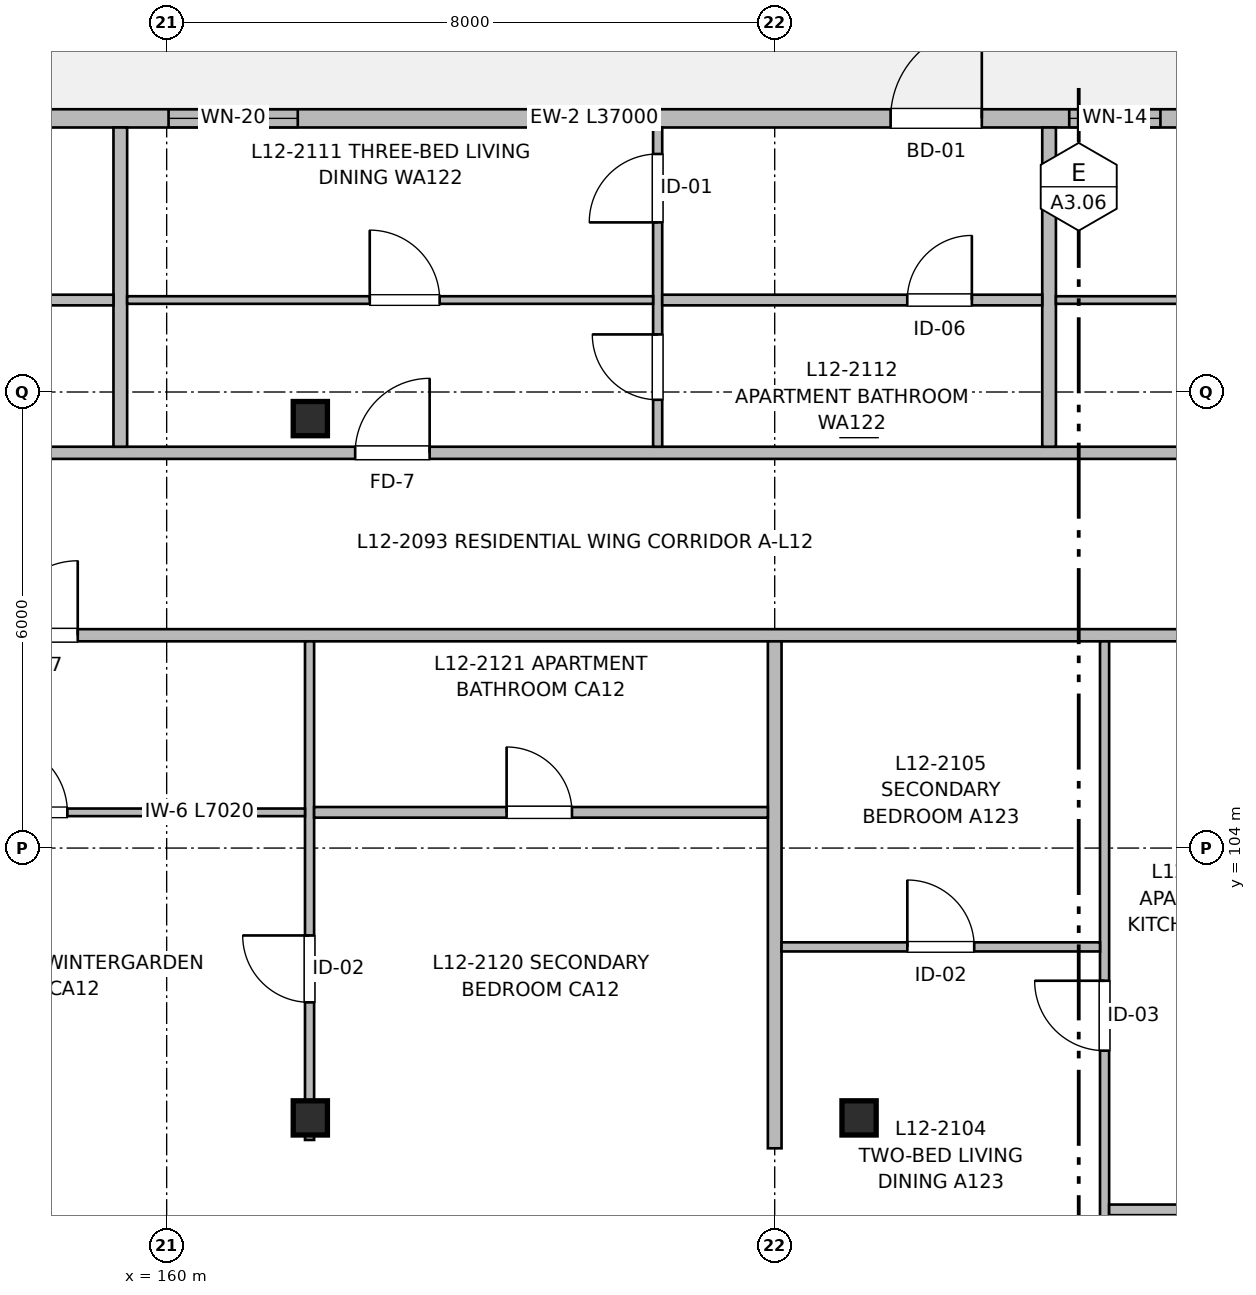
"""IFC4 building model, lengths in metres.
Left out: names, types, materials, properties, quantities, classifications, styles, units other than length and angle.
Written with IfcOpenShell. Run it as: python <this file> out.ifc"""

import sys

from ifc_helpers import new_model, si_unit, direction, frame, frame_2d, origin, origin_2d, place, context, subcontext, project, spatial, rectangle, extrude, element, fill, save


model = new_model("IFC4")
c1 = context("Model", 3, precision=1e-05, world=origin(), true_north=direction((0.0, 1.0)))
c2 = subcontext(c1, "Body", "Model", "MODEL_VIEW")
j1 = project(units=[si_unit("LENGTHUNIT", "METRE"), si_unit("PLANEANGLEUNIT", "RADIAN")], contexts=[c1])
p1 = place(None, origin())
s1 = spatial("IfcSite", under=j1, at=p1, CompositionType="ELEMENT")
p2 = place(p1, origin())
s2 = spatial("IfcBuilding", under=s1, at=p2, CompositionType="ELEMENT")
p3 = place(p2, frame((0.0, 0.0, 39.36)))
s3 = spatial("IfcBuildingStorey", under=s2, at=p3, CompositionType="ELEMENT", Elevation=39.36)
for number, where, z_axis, x_axis in (
    (1, (161.89, 100.45, 0.0), (0.0, 0.0, 1.0), (1.0, 0.0, 0.0)),
    (2, (161.89, 109.65, 0.0), (0.0, 0.0, 1.0), (1.0, 0.0, 0.0)),
    (3, (169.11, 100.45, 0.0), (0.0, 0.0, 1.0), (1.0, 0.0, 0.0)),
    (4, (169.11, 109.65, 0.0), (0.0, 0.0, 1.0), (1.0, 0.0, 0.0)),
):
    element("IfcColumn", number, at=place(p3, frame(where, z_axis=z_axis, x_axis=x_axis)), inside=s3, PredefinedType="COLUMN", context=c2, shape_type="SweptSolid", body=[
        extrude(rectangle(XDim=0.45, YDim=0.45, at=origin_2d()), origin(), (0.0, 0.0, 1.0), 3.2),
    ])
p4 = place(p3, frame((147.0, 113.6, 0.0), z_axis=(0.0, 0.0, 1.0), x_axis=(1.0, 0.0, 0.0)))
e5 = element("IfcWall", 5, at=p4, inside=s3, PredefinedType="SOLIDWALL", context=c2, shape_type="SweptSolid", body=[
    extrude(rectangle(XDim=37.0, YDim=0.24, at=frame_2d((18.5, 0.0))), origin(), (0.0, 0.0, 1.0), 2.98),
])
p5 = place(p4, frame((4.025, 0.0, 0.0)))
e6 = element("IfcOpeningElement", 6, at=p5, cuts=e5, PredefinedType="OPENING", context=c2, shape_type="SweptSolid", body=[
    extrude(rectangle(XDim=1.2, YDim=2.2, at=frame_2d((0.6, 1.1))), frame((0.0, 0.13, 0.0), z_axis=(0.0, -1.0, 0.0), x_axis=(1.0, 0.0, 0.0)), (0.0, 0.0, 1.0), 0.26),
])
p6 = place(p4, frame((7.725, 0.0, 0.72)))
e7 = element("IfcOpeningElement", 7, at=p6, cuts=e5, PredefinedType="OPENING", context=c2, shape_type="SweptSolid", body=[
    extrude(rectangle(XDim=2.25, YDim=1.5, at=frame_2d((1.125, 0.75))), frame((0.0, 0.13, 0.0), z_axis=(0.0, -1.0, 0.0), x_axis=(1.0, 0.0, 0.0)), (0.0, 0.0, 1.0), 0.26),
])
p7 = place(p4, frame((13.025, 0.0, 0.72)))
e8 = element("IfcOpeningElement", 8, at=p7, cuts=e5, PredefinedType="OPENING", context=c2, shape_type="SweptSolid", body=[
    extrude(rectangle(XDim=1.7, YDim=1.5, at=frame_2d((0.85, 0.75))), frame((0.0, 0.13, 0.0), z_axis=(0.0, -1.0, 0.0), x_axis=(1.0, 0.0, 0.0)), (0.0, 0.0, 1.0), 0.26),
])
p8 = place(p4, frame((22.525, 0.0, 0.0)))
e9 = element("IfcOpeningElement", 9, at=p8, cuts=e5, PredefinedType="OPENING", context=c2, shape_type="SweptSolid", body=[
    extrude(rectangle(XDim=1.2, YDim=2.2, at=frame_2d((0.6, 1.1))), frame((0.0, 0.13, 0.0), z_axis=(0.0, -1.0, 0.0), x_axis=(1.0, 0.0, 0.0)), (0.0, 0.0, 1.0), 0.26),
])
p9 = place(p4, frame((24.875, 0.0, 0.9)))
e10 = element("IfcOpeningElement", 10, at=p9, cuts=e5, PredefinedType="OPENING", context=c2, shape_type="SweptSolid", body=[
    extrude(rectangle(XDim=1.2, YDim=1.05, at=frame_2d((0.6, 0.525))), frame((0.0, 0.13, 0.0), z_axis=(0.0, -1.0, 0.0), x_axis=(1.0, 0.0, 0.0)), (0.0, 0.0, 1.0), 0.26),
])
p10 = place(p4, frame((32.1, 0.0, 0.77)))
e11 = element("IfcOpeningElement", 11, at=p10, cuts=e5, PredefinedType="OPENING", context=c2, shape_type="SweptSolid", body=[
    extrude(rectangle(XDim=1.45, YDim=1.45, at=frame_2d((0.725, 0.725))), frame((0.0, 0.13, 0.0), z_axis=(0.0, -1.0, 0.0), x_axis=(1.0, 0.0, 0.0)), (0.0, 0.0, 1.0), 0.26),
])
p11 = place(p3, frame((147.16, 106.8, 0.0), z_axis=(0.0, 0.0, 1.0), x_axis=(1.0, 0.0, 0.0)))
e12 = element("IfcWall", 12, at=p11, inside=s3, PredefinedType="PARTITIONING", context=c2, shape_type="SweptSolid", body=[
    extrude(rectangle(XDim=27.64, YDim=0.16, at=frame_2d((13.82, 0.0))), origin(), (0.0, 0.0, 1.0), 2.935),
])
p12 = place(p11, frame((3.515, 0.0, 0.0)))
e13 = element("IfcOpeningElement", 13, at=p12, cuts=e12, PredefinedType="OPENING", context=c2, shape_type="SweptSolid", body=[
    extrude(rectangle(XDim=1.05, YDim=2.15, at=frame_2d((0.525, 1.075))), frame((0.0, 0.09, 0.0), z_axis=(0.0, -1.0, 0.0), x_axis=(1.0, 0.0, 0.0)), (0.0, 0.0, 1.0), 0.18),
])
p13 = place(p11, frame((10.69, 0.0, 0.0)))
e14 = element("IfcOpeningElement", 14, at=p13, cuts=e12, PredefinedType="OPENING", context=c2, shape_type="SweptSolid", body=[
    extrude(rectangle(XDim=0.98, YDim=2.15, at=frame_2d((0.49, 1.075))), frame((0.0, 0.09, 0.0), z_axis=(0.0, -1.0, 0.0), x_axis=(1.0, 0.0, 0.0)), (0.0, 0.0, 1.0), 0.18),
])
p14 = place(p3, frame((147.16, 109.2, 0.0), z_axis=(0.0, 0.0, 1.0), x_axis=(1.0, 0.0, 0.0)))
e15 = element("IfcWall", 15, at=p14, inside=s3, PredefinedType="PARTITIONING", context=c2, shape_type="SweptSolid", body=[
    extrude(rectangle(XDim=36.68, YDim=0.16, at=frame_2d((18.34, 0.0))), origin(), (0.0, 0.0, 1.0), 2.935),
])
p15 = place(p14, frame((3.03, 0.0, 0.0)))
e16 = element("IfcOpeningElement", 16, at=p15, cuts=e15, PredefinedType="OPENING", context=c2, shape_type="SweptSolid", body=[
    extrude(rectangle(XDim=0.98, YDim=2.15, at=frame_2d((0.49, 1.075))), frame((0.0, 0.09, 0.0), z_axis=(0.0, -1.0, 0.0), x_axis=(1.0, 0.0, 0.0)), (0.0, 0.0, 1.0), 0.18),
])
p16 = place(p14, frame((15.32, 0.0, 0.0)))
e17 = element("IfcOpeningElement", 17, at=p16, cuts=e15, PredefinedType="OPENING", context=c2, shape_type="SweptSolid", body=[
    extrude(rectangle(XDim=0.98, YDim=2.15, at=frame_2d((0.49, 1.075))), frame((0.0, 0.09, 0.0), z_axis=(0.0, -1.0, 0.0), x_axis=(1.0, 0.0, 0.0)), (0.0, 0.0, 1.0), 0.18),
])
p17 = place(p14, frame((27.57, 0.0, 0.0)))
e18 = element("IfcOpeningElement", 18, at=p17, cuts=e15, PredefinedType="OPENING", context=c2, shape_type="SweptSolid", body=[
    extrude(rectangle(XDim=0.98, YDim=2.15, at=frame_2d((0.49, 1.075))), frame((0.0, 0.09, 0.0), z_axis=(0.0, -1.0, 0.0), x_axis=(1.0, 0.0, 0.0)), (0.0, 0.0, 1.0), 0.18),
])
p18 = place(p3, frame((168.0, 100.05, 0.0), z_axis=(0.0, 0.0, 1.0), x_axis=(0.0, 1.0, 0.0)))
e19 = element("IfcWall", 19, at=p18, inside=s3, PredefinedType="PARTITIONING", context=c2, shape_type="SweptSolid", body=[
    extrude(rectangle(XDim=6.67, YDim=0.18, at=frame_2d((3.335, 0.0))), origin(), (0.0, 0.0, 1.0), 2.935),
])
p19 = place(p3, frame((172.34, 92.87, 0.0), z_axis=(0.0, 0.0, 1.0), x_axis=(0.0, 1.0, 0.0)))
e20 = element("IfcWall", 20, at=p19, inside=s3, PredefinedType="PARTITIONING", context=c2, shape_type="SweptSolid", body=[
    extrude(rectangle(XDim=13.85, YDim=0.12, at=frame_2d((6.925, 0.0))), origin(), (0.0, 0.0, 1.0), 2.935),
])
p20 = place(p19, frame((2.421, 0.0, 0.0)))
e21 = element("IfcOpeningElement", 21, at=p20, cuts=e20, PredefinedType="OPENING", context=c2, shape_type="SweptSolid", body=[
    extrude(rectangle(XDim=0.86, YDim=2.1, at=frame_2d((0.43, 1.05))), frame((0.0, 0.07, 0.0), z_axis=(0.0, -1.0, 0.0), x_axis=(1.0, 0.0, 0.0)), (0.0, 0.0, 1.0), 0.14),
])
p21 = place(p19, frame((8.464, 0.0, 0.0)))
e22 = element("IfcOpeningElement", 22, at=p21, cuts=e20, PredefinedType="OPENING", context=c2, shape_type="SweptSolid", body=[
    extrude(rectangle(XDim=0.92, YDim=2.1, at=frame_2d((0.46, 1.05))), frame((0.0, 0.07, 0.0), z_axis=(0.0, -1.0, 0.0), x_axis=(1.0, 0.0, 0.0)), (0.0, 0.0, 1.0), 0.14),
])
p22 = place(p3, frame((172.4, 99.24, 0.0), z_axis=(0.0, 0.0, 1.0), x_axis=(1.0, 0.0, 0.0)))
e23 = element("IfcWall", 23, at=p22, inside=s3, PredefinedType="PARTITIONING", context=c2, shape_type="SweptSolid", body=[
    extrude(rectangle(XDim=2.32, YDim=0.14, at=frame_2d((1.16, 0.0))), origin(), (0.0, 0.0, 1.0), 2.935),
])
p23 = place(p3, frame((168.09, 102.7, 0.0), z_axis=(0.0, 0.0, 1.0), x_axis=(1.0, 0.0, 0.0)))
e24 = element("IfcWall", 24, at=p23, inside=s3, PredefinedType="PARTITIONING", context=c2, shape_type="SweptSolid", body=[
    extrude(rectangle(XDim=4.19, YDim=0.12, at=frame_2d((2.095, 0.0))), origin(), (0.0, 0.0, 1.0), 2.935),
])
p24 = place(p23, frame((1.655, 0.0, 0.0)))
e25 = element("IfcOpeningElement", 25, at=p24, cuts=e24, PredefinedType="OPENING", context=c2, shape_type="SweptSolid", body=[
    extrude(rectangle(XDim=0.88, YDim=2.1, at=frame_2d((0.44, 1.05))), frame((0.0, 0.07, 0.0), z_axis=(0.0, -1.0, 0.0), x_axis=(1.0, 0.0, 0.0)), (0.0, 0.0, 1.0), 0.14),
])
for number, where, z_axis, x_axis in (
    (26, (159.39, 109.28, 0.0), (0.0, 0.0, 1.0), (0.0, 1.0, 0.0)),
    (27, (171.61, 109.28, 0.0), (0.0, 0.0, 1.0), (0.0, 1.0, 0.0)),
):
    element("IfcWall", number, at=place(p3, frame(where, z_axis=z_axis, x_axis=x_axis)), inside=s3, PredefinedType="PARTITIONING", context=c2, shape_type="SweptSolid", body=[
        extrude(rectangle(XDim=4.2, YDim=0.18, at=frame_2d((2.1, 0.0))), origin(), (0.0, 0.0, 1.0), 2.935),
    ])
p25 = place(p3, frame((154.26, 111.21, 0.0), z_axis=(0.0, 0.0, 1.0), x_axis=(1.0, 0.0, 0.0)))
e28 = element("IfcWall", 28, at=p25, inside=s3, PredefinedType="PARTITIONING", context=c2, shape_type="SweptSolid", body=[
    extrude(rectangle(XDim=5.04, YDim=0.14, at=frame_2d((2.52, 0.0))), origin(), (0.0, 0.0, 1.0), 2.935),
])
p26 = place(p25, frame((2.04, 0.0, 0.0)))
e29 = element("IfcOpeningElement", 29, at=p26, cuts=e28, PredefinedType="OPENING", context=c2, shape_type="SweptSolid", body=[
    extrude(rectangle(XDim=0.85, YDim=2.05, at=frame_2d((0.425, 1.025))), frame((0.0, 0.08, 0.0), z_axis=(0.0, -1.0, 0.0), x_axis=(1.0, 0.0, 0.0)), (0.0, 0.0, 1.0), 0.16),
])
p27 = place(p3, frame((166.46, 109.28, 0.0), z_axis=(0.0, 0.0, 1.0), x_axis=(0.0, 1.0, 0.0)))
e30 = element("IfcWall", 30, at=p27, inside=s3, PredefinedType="PARTITIONING", context=c2, shape_type="SweptSolid", body=[
    extrude(rectangle(XDim=4.2, YDim=0.12, at=frame_2d((2.1, 0.0))), origin(), (0.0, 0.0, 1.0), 2.935),
])
p28 = place(p27, frame((0.618, 0.0, 0.0)))
e31 = element("IfcOpeningElement", 31, at=p28, cuts=e30, PredefinedType="OPENING", context=c2, shape_type="SweptSolid", body=[
    extrude(rectangle(XDim=0.86, YDim=2.1, at=frame_2d((0.43, 1.05))), frame((0.0, 0.07, 0.0), z_axis=(0.0, -1.0, 0.0), x_axis=(1.0, 0.0, 0.0)), (0.0, 0.0, 1.0), 0.14),
])
p29 = place(p27, frame((2.951, 0.0, 0.0)))
e32 = element("IfcOpeningElement", 32, at=p29, cuts=e30, PredefinedType="OPENING", context=c2, shape_type="SweptSolid", body=[
    extrude(rectangle(XDim=0.9, YDim=2.1, at=frame_2d((0.45, 1.05))), frame((0.0, 0.07, 0.0), z_axis=(0.0, -1.0, 0.0), x_axis=(1.0, 0.0, 0.0)), (0.0, 0.0, 1.0), 0.14),
])
p30 = place(p3, frame((166.52, 111.21, 0.0), z_axis=(0.0, 0.0, 1.0), x_axis=(1.0, 0.0, 0.0)))
e33 = element("IfcWall", 33, at=p30, inside=s3, PredefinedType="PARTITIONING", context=c2, shape_type="SweptSolid", body=[
    extrude(rectangle(XDim=5.0, YDim=0.14, at=frame_2d((2.5, 0.0))), origin(), (0.0, 0.0, 1.0), 2.935),
])
p31 = place(p30, frame((3.224, 0.0, 0.0)))
e34 = element("IfcOpeningElement", 34, at=p31, cuts=e33, PredefinedType="OPENING", context=c2, shape_type="SweptSolid", body=[
    extrude(rectangle(XDim=0.85, YDim=2.05, at=frame_2d((0.425, 1.025))), frame((0.0, 0.08, 0.0), z_axis=(0.0, -1.0, 0.0), x_axis=(1.0, 0.0, 0.0)), (0.0, 0.0, 1.0), 0.16),
])
p32 = place(p3, frame((159.48, 111.21, 0.0), z_axis=(0.0, 0.0, 1.0), x_axis=(1.0, 0.0, 0.0)))
e35 = element("IfcWall", 35, at=p32, inside=s3, PredefinedType="PARTITIONING", context=c2, shape_type="SweptSolid", body=[
    extrude(rectangle(XDim=6.92, YDim=0.1, at=frame_2d((3.46, 0.0))), origin(), (0.0, 0.0, 1.0), 2.935),
])
p33 = place(p32, frame((3.192, 0.0, 0.0)))
e36 = element("IfcOpeningElement", 36, at=p33, cuts=e35, PredefinedType="OPENING", context=c2, shape_type="SweptSolid", body=[
    extrude(rectangle(XDim=0.92, YDim=2.1, at=frame_2d((0.46, 1.05))), frame((0.0, 0.06, 0.0), z_axis=(0.0, -1.0, 0.0), x_axis=(1.0, 0.0, 0.0)), (0.0, 0.0, 1.0), 0.12),
])
p34 = place(p3, frame((171.7, 111.21, 0.0), z_axis=(0.0, 0.0, 1.0), x_axis=(1.0, 0.0, 0.0)))
e37 = element("IfcWall", 37, at=p34, inside=s3, PredefinedType="PARTITIONING", context=c2, shape_type="SweptSolid", body=[
    extrude(rectangle(XDim=6.98, YDim=0.1, at=frame_2d((3.49, 0.0))), origin(), (0.0, 0.0, 1.0), 2.935),
])
p35 = place(p34, frame((2.816, 0.0, 0.0)))
e38 = element("IfcOpeningElement", 38, at=p35, cuts=e37, PredefinedType="OPENING", context=c2, shape_type="SweptSolid", body=[
    extrude(rectangle(XDim=0.92, YDim=2.1, at=frame_2d((0.46, 1.05))), frame((0.0, 0.06, 0.0), z_axis=(0.0, -1.0, 0.0), x_axis=(1.0, 0.0, 0.0)), (0.0, 0.0, 1.0), 0.12),
])
p36 = place(p3, frame((161.88, 100.16, 0.0), z_axis=(0.0, 0.0, 1.0), x_axis=(0.0, 1.0, 0.0)))
e39 = element("IfcWall", 39, at=p36, inside=s3, PredefinedType="PARTITIONING", context=c2, shape_type="SweptSolid", body=[
    extrude(rectangle(XDim=6.56, YDim=0.12, at=frame_2d((3.28, 0.0))), origin(), (0.0, 0.0, 1.0), 2.68),
])
p37 = place(p36, frame((1.81, 0.0, 0.0)))
e40 = element("IfcOpeningElement", 40, at=p37, cuts=e39, PredefinedType="OPENING", context=c2, shape_type="SweptSolid", body=[
    extrude(rectangle(XDim=0.88, YDim=2.1, at=frame_2d((0.44, 1.05))), frame((0.0, 0.07, 0.0), z_axis=(0.0, -1.0, 0.0), x_axis=(1.0, 0.0, 0.0)), (0.0, 0.0, 1.0), 0.14),
])
p38 = place(p3, frame((161.94, 104.47, 0.0), z_axis=(0.0, 0.0, 1.0), x_axis=(1.0, 0.0, 0.0)))
e41 = element("IfcWall", 41, at=p38, inside=s3, PredefinedType="PARTITIONING", context=c2, shape_type="SweptSolid", body=[
    extrude(rectangle(XDim=5.97, YDim=0.14, at=frame_2d((2.985, 0.0))), origin(), (0.0, 0.0, 1.0), 2.935),
])
p39 = place(p38, frame((2.533, 0.0, 0.0)))
e42 = element("IfcOpeningElement", 42, at=p39, cuts=e41, PredefinedType="OPENING", context=c2, shape_type="SweptSolid", body=[
    extrude(rectangle(XDim=0.86, YDim=2.1, at=frame_2d((0.43, 1.05))), frame((0.0, 0.08, 0.0), z_axis=(0.0, -1.0, 0.0), x_axis=(1.0, 0.0, 0.0)), (0.0, 0.0, 1.0), 0.16),
])
p40 = place(p3, frame((154.8, 104.47, 0.0), z_axis=(0.0, 0.0, 1.0), x_axis=(1.0, 0.0, 0.0)))
e43 = element("IfcWall", 43, at=p40, inside=s3, PredefinedType="PARTITIONING", context=c2, shape_type="SweptSolid", body=[
    extrude(rectangle(XDim=7.02, YDim=0.1, at=frame_2d((3.51, 0.0))), origin(), (0.0, 0.0, 1.0), 2.935),
])
p41 = place(p40, frame((2.974, 0.0, 0.0)))
e44 = element("IfcOpeningElement", 44, at=p41, cuts=e43, PredefinedType="OPENING", context=c2, shape_type="SweptSolid", body=[
    extrude(rectangle(XDim=0.92, YDim=2.1, at=frame_2d((0.46, 1.05))), frame((0.0, 0.06, 0.0), z_axis=(0.0, -1.0, 0.0), x_axis=(1.0, 0.0, 0.0)), (0.0, 0.0, 1.0), 0.12),
])
p42 = place(p7, origin())
e45 = element("IfcWindow", 45, at=p42, inside=s3, PartitioningType="SINGLE_PANEL", PredefinedType="WINDOW", context=c2, shape_type="SweptSolid", body=[
    extrude(rectangle(XDim=1.7, YDim=1.5, at=frame_2d((0.85, 0.75))), frame((0.0, 0.03, 0.0), z_axis=(0.0, -1.0, 0.0), x_axis=(1.0, 0.0, 0.0)), (0.0, 0.0, 1.0), 0.06),
])
fill(e8, e45)
p43 = place(p8, origin())
e46 = element("IfcDoor", 46, at=p43, inside=s3, OperationType="SINGLE_SWING_RIGHT", PredefinedType="DOOR", context=c2, shape_type="SweptSolid", body=[
    extrude(rectangle(XDim=1.2, YDim=2.2, at=frame_2d((0.6, 1.1))), frame((0.0, 0.025, 0.0), z_axis=(0.0, -1.0, 0.0), x_axis=(1.0, 0.0, 0.0)), (0.0, 0.0, 1.0), 0.05),
])
fill(e9, e46)
p44 = place(p9, origin())
e47 = element("IfcWindow", 47, at=p44, inside=s3, PartitioningType="SINGLE_PANEL", PredefinedType="WINDOW", context=c2, shape_type="SweptSolid", body=[
    extrude(rectangle(XDim=1.2, YDim=1.05, at=frame_2d((0.6, 0.525))), frame((0.0, 0.03, 0.0), z_axis=(0.0, -1.0, 0.0), x_axis=(1.0, 0.0, 0.0)), (0.0, 0.0, 1.0), 0.06),
])
fill(e10, e47)
p45 = place(p21, origin())
e48 = element("IfcDoor", 48, at=p45, inside=s3, OperationType="SINGLE_SWING_RIGHT", PredefinedType="DOOR", context=c2, shape_type="SweptSolid", body=[
    extrude(rectangle(XDim=0.92, YDim=2.1, at=frame_2d((0.46, 1.05))), frame((0.0, 0.025, 0.0), z_axis=(0.0, -1.0, 0.0), x_axis=(1.0, 0.0, 0.0)), (0.0, 0.0, 1.0), 0.05),
])
fill(e22, e48)
p46 = place(p24, origin())
e49 = element("IfcDoor", 49, at=p46, inside=s3, OperationType="SINGLE_SWING_LEFT", PredefinedType="DOOR", context=c2, shape_type="SweptSolid", body=[
    extrude(rectangle(XDim=0.88, YDim=2.1, at=frame_2d((0.44, 1.05))), frame((0.0, 0.025, 0.0), z_axis=(0.0, -1.0, 0.0), x_axis=(1.0, 0.0, 0.0)), (0.0, 0.0, 1.0), 0.05),
])
fill(e25, e49)
p47 = place(p16, origin())
e50 = element("IfcDoor", 50, at=p47, inside=s3, OperationType="SINGLE_SWING_RIGHT", PredefinedType="DOOR", context=c2, shape_type="SweptSolid", body=[
    extrude(rectangle(XDim=0.98, YDim=2.15, at=frame_2d((0.49, 1.075))), frame((0.0, 0.025, 0.0), z_axis=(0.0, -1.0, 0.0), x_axis=(1.0, 0.0, 0.0)), (0.0, 0.0, 1.0), 0.05),
])
fill(e17, e50)
p48 = place(p33, origin())
e51 = element("IfcDoor", 51, at=p48, inside=s3, OperationType="SINGLE_SWING_LEFT", PredefinedType="DOOR", context=c2, shape_type="SweptSolid", body=[
    extrude(rectangle(XDim=0.92, YDim=2.1, at=frame_2d((0.46, 1.05))), frame((0.0, 0.025, 0.0), z_axis=(0.0, -1.0, 0.0), x_axis=(1.0, 0.0, 0.0)), (0.0, 0.0, 1.0), 0.05),
])
fill(e36, e51)
p49 = place(p28, origin())
e52 = element("IfcDoor", 52, at=p49, inside=s3, OperationType="SINGLE_SWING_RIGHT", PredefinedType="DOOR", context=c2, shape_type="SweptSolid", body=[
    extrude(rectangle(XDim=0.86, YDim=2.1, at=frame_2d((0.43, 1.05))), frame((0.0, 0.025, 0.0), z_axis=(0.0, -1.0, 0.0), x_axis=(1.0, 0.0, 0.0)), (0.0, 0.0, 1.0), 0.05),
])
fill(e31, e52)
p50 = place(p29, origin())
e53 = element("IfcDoor", 53, at=p50, inside=s3, OperationType="SINGLE_SWING_LEFT", PredefinedType="DOOR", context=c2, shape_type="SweptSolid", body=[
    extrude(rectangle(XDim=0.9, YDim=2.1, at=frame_2d((0.45, 1.05))), frame((0.0, 0.025, 0.0), z_axis=(0.0, -1.0, 0.0), x_axis=(1.0, 0.0, 0.0)), (0.0, 0.0, 1.0), 0.05),
])
fill(e32, e53)
p51 = place(p31, origin())
e54 = element("IfcDoor", 54, at=p51, inside=s3, OperationType="SINGLE_SWING_RIGHT", PredefinedType="DOOR", context=c2, shape_type="SweptSolid", body=[
    extrude(rectangle(XDim=0.85, YDim=2.05, at=frame_2d((0.425, 1.025))), frame((0.0, 0.025, 0.0), z_axis=(0.0, -1.0, 0.0), x_axis=(1.0, 0.0, 0.0)), (0.0, 0.0, 1.0), 0.05),
])
fill(e34, e54)
p52 = place(p13, origin())
e55 = element("IfcDoor", 55, at=p52, inside=s3, OperationType="SINGLE_SWING_RIGHT", PredefinedType="DOOR", context=c2, shape_type="SweptSolid", body=[
    extrude(rectangle(XDim=0.98, YDim=2.15, at=frame_2d((0.49, 1.075))), frame((0.0, 0.025, 0.0), z_axis=(0.0, -1.0, 0.0), x_axis=(1.0, 0.0, 0.0)), (0.0, 0.0, 1.0), 0.05),
])
fill(e14, e55)
p53 = place(p41, origin())
e56 = element("IfcDoor", 56, at=p53, inside=s3, OperationType="SINGLE_SWING_LEFT", PredefinedType="DOOR", context=c2, shape_type="SweptSolid", body=[
    extrude(rectangle(XDim=0.92, YDim=2.1, at=frame_2d((0.46, 1.05))), frame((0.0, 0.025, 0.0), z_axis=(0.0, -1.0, 0.0), x_axis=(1.0, 0.0, 0.0)), (0.0, 0.0, 1.0), 0.05),
])
fill(e44, e56)
p54 = place(p37, origin())
e57 = element("IfcDoor", 57, at=p54, inside=s3, OperationType="SINGLE_SWING_RIGHT", PredefinedType="DOOR", context=c2, shape_type="SweptSolid", body=[
    extrude(rectangle(XDim=0.88, YDim=2.1, at=frame_2d((0.44, 1.05))), frame((0.0, 0.025, 0.0), z_axis=(0.0, -1.0, 0.0), x_axis=(1.0, 0.0, 0.0)), (0.0, 0.0, 1.0), 0.05),
])
fill(e40, e57)
p55 = place(p39, origin())
e58 = element("IfcDoor", 58, at=p55, inside=s3, OperationType="SINGLE_SWING_LEFT", PredefinedType="DOOR", context=c2, shape_type="SweptSolid", body=[
    extrude(rectangle(XDim=0.86, YDim=2.1, at=frame_2d((0.43, 1.05))), frame((0.0, 0.025, 0.0), z_axis=(0.0, -1.0, 0.0), x_axis=(1.0, 0.0, 0.0)), (0.0, 0.0, 1.0), 0.05),
])
fill(e42, e58)
save(model, sys.argv[1])
